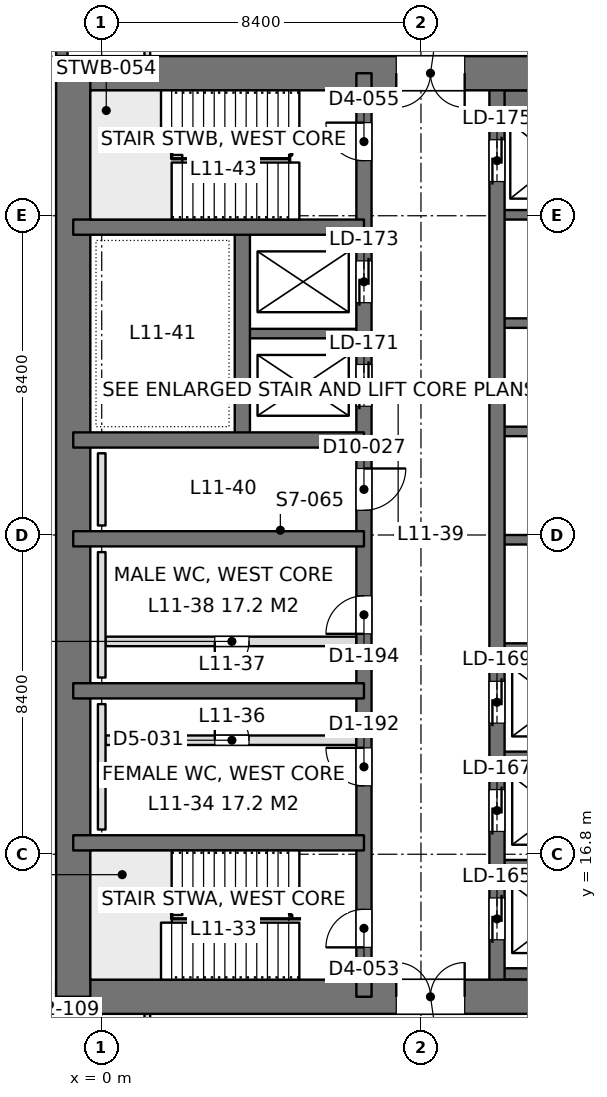
"""IFC4 building model, lengths in metres.
Left out: names, types, materials, properties, quantities, classifications, styles, units other than length and angle.
Written with IfcOpenShell. Run it as: python <this file> out.ifc"""

import sys

from ifc_helpers import new_model, si_unit, direction, frame, frame_2d, origin, place, context, subcontext, project, spatial, rectangle, extrude, element, fill, save


model = new_model("IFC4")
c1 = context("Model", 3, precision=1e-05, world=origin(), true_north=direction((0.0, 1.0)))
c2 = subcontext(c1, "Body", "Model", "MODEL_VIEW")
j1 = project(units=[si_unit("LENGTHUNIT", "METRE"), si_unit("PLANEANGLEUNIT", "RADIAN")], contexts=[c1])
p1 = place(None, origin())
s1 = spatial("IfcSite", under=j1, at=p1, CompositionType="ELEMENT")
p2 = place(p1, origin())
s2 = spatial("IfcBuilding", under=s1, at=p2, CompositionType="ELEMENT")
p3 = place(p2, frame((0.0, 0.0, 50.4)))
s3 = spatial("IfcBuildingStorey", under=s2, at=p3, CompositionType="ELEMENT", Elevation=50.4)
p4 = place(p3, frame((-1.2, 13.05, 0.0), z_axis=(0.0, 0.0, 1.0), x_axis=(1.0, 0.0, 0.0)))
e1 = element("IfcWall", 1, at=p4, inside=s3, PredefinedType="SHEAR", context=c2, shape_type="SweptSolid", body=[
    extrude(rectangle(XDim=18.0, YDim=0.9, at=frame_2d((9.0, 0.0))), origin(), (0.0, 0.0, 1.0), 4.5),
])
p5 = place(p4, frame((8.95, 0.0, 0.0)))
e2 = element("IfcOpeningElement", 2, at=p5, cuts=e1, PredefinedType="OPENING", context=c2, shape_type="SweptSolid", body=[
    extrude(rectangle(XDim=1.8, YDim=2.4, at=frame_2d((0.9, 1.2))), frame((0.0, 0.46, 0.0), z_axis=(0.0, -1.0, 0.0), x_axis=(1.0, 0.0, 0.0)), (0.0, 0.0, 1.0), 0.92),
])
p6 = place(p3, frame((-1.2, 37.35, 0.0), z_axis=(0.0, 0.0, 1.0), x_axis=(1.0, 0.0, 0.0)))
e3 = element("IfcWall", 3, at=p6, inside=s3, PredefinedType="SHEAR", context=c2, shape_type="SweptSolid", body=[
    extrude(rectangle(XDim=18.0, YDim=0.9, at=frame_2d((9.0, 0.0))), origin(), (0.0, 0.0, 1.0), 4.5),
])
p7 = place(p6, frame((8.95, 0.0, 0.0)))
e4 = element("IfcOpeningElement", 4, at=p7, cuts=e3, PredefinedType="OPENING", context=c2, shape_type="SweptSolid", body=[
    extrude(rectangle(XDim=1.8, YDim=2.4, at=frame_2d((0.9, 1.2))), frame((0.0, 0.46, 0.0), z_axis=(0.0, -1.0, 0.0), x_axis=(1.0, 0.0, 0.0)), (0.0, 0.0, 1.0), 0.92),
])
p8 = place(p3, frame((-0.75, 13.05, 0.0), z_axis=(0.0, 0.0, 1.0), x_axis=(0.0, 1.0, 0.0)))
e5 = element("IfcWall", 5, at=p8, inside=s3, PredefinedType="SHEAR", context=c2, shape_type="SweptSolid", body=[
    extrude(rectangle(XDim=24.3, YDim=0.9, at=frame_2d((12.15, 0.0))), origin(), (0.0, 0.0, 1.0), 4.5),
])
p9 = place(p3, frame((6.9, 13.05, 0.0), z_axis=(0.0, 0.0, 1.0), x_axis=(0.0, 1.0, 0.0)))
e6 = element("IfcWall", 6, at=p9, inside=s3, PredefinedType="SHEAR", context=c2, shape_type="SweptSolid", body=[
    extrude(rectangle(XDim=24.3, YDim=0.4, at=frame_2d((12.15, 0.0))), origin(), (0.0, 0.0, 1.0), 4.5),
])
p10 = place(p9, frame((1.3, 0.0, 0.0)))
e7 = element("IfcOpeningElement", 7, at=p10, cuts=e6, PredefinedType="OPENING", context=c2, shape_type="SweptSolid", body=[
    extrude(rectangle(XDim=1.0, YDim=2.2, at=frame_2d((0.5, 1.1))), frame((0.0, 0.21, 0.0), z_axis=(0.0, -1.0, 0.0), x_axis=(1.0, 0.0, 0.0)), (0.0, 0.0, 1.0), 0.42),
])
p11 = place(p9, frame((22.0, 0.0, 0.0)))
e8 = element("IfcOpeningElement", 8, at=p11, cuts=e6, PredefinedType="OPENING", context=c2, shape_type="SweptSolid", body=[
    extrude(rectangle(XDim=1.0, YDim=2.2, at=frame_2d((0.5, 1.1))), frame((0.0, 0.21, 0.0), z_axis=(0.0, -1.0, 0.0), x_axis=(1.0, 0.0, 0.0)), (0.0, 0.0, 1.0), 0.42),
])
p12 = place(p9, frame((5.55, 0.0, 0.0)))
e9 = element("IfcOpeningElement", 9, at=p12, cuts=e6, PredefinedType="OPENING", context=c2, shape_type="SweptSolid", body=[
    extrude(rectangle(XDim=1.0, YDim=2.2, at=frame_2d((0.5, 1.1))), frame((0.0, 0.21, 0.0), z_axis=(0.0, -1.0, 0.0), x_axis=(1.0, 0.0, 0.0)), (0.0, 0.0, 1.0), 0.42),
])
p13 = place(p9, frame((9.55, 0.0, 0.0)))
e10 = element("IfcOpeningElement", 10, at=p13, cuts=e6, PredefinedType="OPENING", context=c2, shape_type="SweptSolid", body=[
    extrude(rectangle(XDim=1.0, YDim=2.2, at=frame_2d((0.5, 1.1))), frame((0.0, 0.21, 0.0), z_axis=(0.0, -1.0, 0.0), x_axis=(1.0, 0.0, 0.0)), (0.0, 0.0, 1.0), 0.42),
])
p14 = place(p9, frame((12.8, 0.0, 0.0)))
e11 = element("IfcOpeningElement", 11, at=p14, cuts=e6, PredefinedType="OPENING", context=c2, shape_type="SweptSolid", body=[
    extrude(rectangle(XDim=1.1, YDim=2.2, at=frame_2d((0.55, 1.1))), frame((0.0, 0.21, 0.0), z_axis=(0.0, -1.0, 0.0), x_axis=(1.0, 0.0, 0.0)), (0.0, 0.0, 1.0), 0.42),
])
p15 = place(p9, frame((15.538, 0.0, 0.0)))
e12 = element("IfcOpeningElement", 12, at=p15, cuts=e6, PredefinedType="OPENING", context=c2, shape_type="SweptSolid", body=[
    extrude(rectangle(XDim=1.1, YDim=2.2, at=frame_2d((0.55, 1.1))), frame((0.0, 0.21, 0.0), z_axis=(0.0, -1.0, 0.0), x_axis=(1.0, 0.0, 0.0)), (0.0, 0.0, 1.0), 0.42),
])
p16 = place(p9, frame((18.262, 0.0, 0.0)))
e13 = element("IfcOpeningElement", 13, at=p16, cuts=e6, PredefinedType="OPENING", context=c2, shape_type="SweptSolid", body=[
    extrude(rectangle(XDim=1.1, YDim=2.2, at=frame_2d((0.55, 1.1))), frame((0.0, 0.21, 0.0), z_axis=(0.0, -1.0, 0.0), x_axis=(1.0, 0.0, 0.0)), (0.0, 0.0, 1.0), 0.42),
])
p17 = place(p3, frame((10.4, 13.05, 0.0), z_axis=(0.0, 0.0, 1.0), x_axis=(0.0, 1.0, 0.0)))
e14 = element("IfcWall", 14, at=p17, inside=s3, PredefinedType="SHEAR", context=c2, shape_type="SweptSolid", body=[
    extrude(rectangle(XDim=24.3, YDim=0.4, at=frame_2d((12.15, 0.0))), origin(), (0.0, 0.0, 1.0), 4.5),
])
p18 = place(p17, frame((1.5, 0.0, 0.0)))
e15 = element("IfcOpeningElement", 15, at=p18, cuts=e14, PredefinedType="OPENING", context=c2, shape_type="SweptSolid", body=[
    extrude(rectangle(XDim=1.1, YDim=2.2, at=frame_2d((0.55, 1.1))), frame((0.0, 0.21, 0.0), z_axis=(0.0, -1.0, 0.0), x_axis=(1.0, 0.0, 0.0)), (0.0, 0.0, 1.0), 0.42),
])
p19 = place(p17, frame((4.35, 0.0, 0.0)))
e16 = element("IfcOpeningElement", 16, at=p19, cuts=e14, PredefinedType="OPENING", context=c2, shape_type="SweptSolid", body=[
    extrude(rectangle(XDim=1.1, YDim=2.2, at=frame_2d((0.55, 1.1))), frame((0.0, 0.21, 0.0), z_axis=(0.0, -1.0, 0.0), x_axis=(1.0, 0.0, 0.0)), (0.0, 0.0, 1.0), 0.42),
])
p20 = place(p17, frame((7.2, 0.0, 0.0)))
e17 = element("IfcOpeningElement", 17, at=p20, cuts=e14, PredefinedType="OPENING", context=c2, shape_type="SweptSolid", body=[
    extrude(rectangle(XDim=1.1, YDim=2.2, at=frame_2d((0.55, 1.1))), frame((0.0, 0.21, 0.0), z_axis=(0.0, -1.0, 0.0), x_axis=(1.0, 0.0, 0.0)), (0.0, 0.0, 1.0), 0.42),
])
p21 = place(p17, frame((21.45, 0.0, 0.0)))
e18 = element("IfcOpeningElement", 18, at=p21, cuts=e14, PredefinedType="OPENING", context=c2, shape_type="SweptSolid", body=[
    extrude(rectangle(XDim=1.1, YDim=2.2, at=frame_2d((0.55, 1.1))), frame((0.0, 0.21, 0.0), z_axis=(0.0, -1.0, 0.0), x_axis=(1.0, 0.0, 0.0)), (0.0, 0.0, 1.0), 0.42),
])
for number, where, z_axis, x_axis in (
    (19, (-0.75, 17.1, 0.0), (0.0, 0.0, 1.0), (1.0, 0.0, 0.0)),
    (20, (-0.75, 21.1, 0.0), (0.0, 0.0, 1.0), (1.0, 0.0, 0.0)),
    (21, (-0.75, 25.1, 0.0), (0.0, 0.0, 1.0), (1.0, 0.0, 0.0)),
    (22, (-0.75, 27.7, 0.0), (0.0, 0.0, 1.0), (1.0, 0.0, 0.0)),
    (23, (-0.75, 33.3, 0.0), (0.0, 0.0, 1.0), (1.0, 0.0, 0.0)),
):
    element("IfcWall", number, at=place(p3, frame(where, z_axis=z_axis, x_axis=x_axis)), inside=s3, PredefinedType="SHEAR", context=c2, shape_type="SweptSolid", body=[
        extrude(rectangle(XDim=7.65, YDim=0.4, at=frame_2d((3.825, 0.0))), origin(), (0.0, 0.0, 1.0), 4.5),
    ])
p22 = place(p3, frame((3.7, 27.7, 0.0), z_axis=(0.0, 0.0, 1.0), x_axis=(0.0, 1.0, 0.0)))
e24 = element("IfcWall", 24, at=p22, inside=s3, PredefinedType="SHEAR", context=c2, shape_type="SweptSolid", body=[
    extrude(rectangle(XDim=5.6, YDim=0.4, at=frame_2d((2.8, 0.0))), origin(), (0.0, 0.0, 1.0), 4.5),
])
p23 = place(p3, frame((3.7, 30.5, 0.0), z_axis=(0.0, 0.0, 1.0), x_axis=(1.0, 0.0, 0.0)))
e25 = element("IfcWall", 25, at=p23, inside=s3, PredefinedType="SHEAR", context=c2, shape_type="SweptSolid", body=[
    extrude(rectangle(XDim=3.2, YDim=0.25, at=frame_2d((1.6, 0.0))), origin(), (0.0, 0.0, 1.0), 4.5),
])
p24 = place(p3, frame((10.4, 13.65, 0.0), z_axis=(0.0, 0.0, 1.0), x_axis=(1.0, 0.0, 0.0)))
e26 = element("IfcWall", 26, at=p24, inside=s3, PredefinedType="SHEAR", context=c2, shape_type="SweptSolid", body=[
    extrude(rectangle(XDim=3.2, YDim=0.3, at=frame_2d((1.6, 0.0))), origin(), (0.0, 0.0, 1.0), 4.5),
])
for number, where, z_axis, x_axis in (
    (27, (10.4, 16.525, 0.0), (0.0, 0.0, 1.0), (1.0, 0.0, 0.0)),
    (28, (10.4, 19.375, 0.0), (0.0, 0.0, 1.0), (1.0, 0.0, 0.0)),
    (29, (10.4, 22.225, 0.0), (0.0, 0.0, 1.0), (1.0, 0.0, 0.0)),
    (30, (10.4, 25.075, 0.0), (0.0, 0.0, 1.0), (1.0, 0.0, 0.0)),
    (31, (10.4, 27.925, 0.0), (0.0, 0.0, 1.0), (1.0, 0.0, 0.0)),
    (32, (10.4, 30.775, 0.0), (0.0, 0.0, 1.0), (1.0, 0.0, 0.0)),
    (33, (10.4, 33.625, 0.0), (0.0, 0.0, 1.0), (1.0, 0.0, 0.0)),
):
    element("IfcWall", number, at=place(p3, frame(where, z_axis=z_axis, x_axis=x_axis)), inside=s3, PredefinedType="SHEAR", context=c2, shape_type="SweptSolid", body=[
        extrude(rectangle(XDim=3.2, YDim=0.25, at=frame_2d((1.6, 0.0))), origin(), (0.0, 0.0, 1.0), 4.5),
    ])
p25 = place(p3, frame((10.4, 36.625, 0.0), z_axis=(0.0, 0.0, 1.0), x_axis=(1.0, 0.0, 0.0)))
e34 = element("IfcWall", 34, at=p25, inside=s3, PredefinedType="SHEAR", context=c2, shape_type="SweptSolid", body=[
    extrude(rectangle(XDim=3.2, YDim=0.55, at=frame_2d((1.6, 0.0))), origin(), (0.0, 0.0, 1.0), 4.5),
])
p26 = place(p3, frame((-1.05, 8.4, 0.0), z_axis=(0.0, 0.0, 1.0), x_axis=(0.0, 1.0, 0.0)))
e35 = element("IfcWall", 35, at=p26, inside=s3, PredefinedType="SOLIDWALL", context=c2, shape_type="SweptSolid", body=[
    extrude(rectangle(XDim=4.2, YDim=0.3, at=frame_2d((2.1, 0.0))), origin(), (0.0, 0.0, 1.0), 4.34),
])
p27 = place(p26, frame((0.9, 0.0, 0.9)))
e36 = element("IfcOpeningElement", 36, at=p27, cuts=e35, PredefinedType="OPENING", context=c2, shape_type="SweptSolid", body=[
    extrude(rectangle(XDim=2.4, YDim=1.9, at=frame_2d((1.2, 0.95))), frame((0.0, 0.16, 0.0), z_axis=(0.0, -1.0, 0.0), x_axis=(1.0, 0.0, 0.0)), (0.0, 0.0, 1.0), 0.32),
])
p28 = place(p3, frame((-1.05, 37.8, 0.0), z_axis=(0.0, 0.0, 1.0), x_axis=(0.0, 1.0, 0.0)))
e37 = element("IfcWall", 37, at=p28, inside=s3, PredefinedType="SOLIDWALL", context=c2, shape_type="SweptSolid", body=[
    extrude(rectangle(XDim=4.2, YDim=0.3, at=frame_2d((2.1, 0.0))), origin(), (0.0, 0.0, 1.0), 4.34),
])
p29 = place(p28, frame((0.9, 0.0, 0.9)))
e38 = element("IfcOpeningElement", 38, at=p29, cuts=e37, PredefinedType="OPENING", context=c2, shape_type="SweptSolid", body=[
    extrude(rectangle(XDim=2.4, YDim=1.9, at=frame_2d((1.2, 0.95))), frame((0.0, 0.16, 0.0), z_axis=(0.0, -1.0, 0.0), x_axis=(1.0, 0.0, 0.0)), (0.0, 0.0, 1.0), 0.32),
])
p30 = place(p3, frame((1.2, 10.8, 0.0), z_axis=(0.0, 0.0, 1.0), x_axis=(0.0, 1.0, 0.0)))
e39 = element("IfcWall", 39, at=p30, inside=s3, PredefinedType="PARTITIONING", context=c2, shape_type="SweptSolid", body=[
    extrude(rectangle(XDim=1.802, YDim=0.15, at=frame_2d((0.901, 0.0))), origin(), (0.0, 0.0, 1.0), 4.34),
])
p31 = place(p3, frame((1.2, 37.8, 0.0), z_axis=(0.0, 0.0, 1.0), x_axis=(0.0, 1.0, 0.0)))
e40 = element("IfcWall", 40, at=p31, inside=s3, PredefinedType="PARTITIONING", context=c2, shape_type="SweptSolid", body=[
    extrude(rectangle(XDim=1.8, YDim=0.15, at=frame_2d((0.9, 0.0))), origin(), (0.0, 0.0, 1.0), 4.34),
])
p32 = place(p3, frame((0.1, 22.4, 0.0), z_axis=(0.0, 0.0, 1.0), x_axis=(1.0, 0.0, 0.0)))
e41 = element("IfcWall", 41, at=p32, inside=s3, PredefinedType="PARTITIONING", context=c2, shape_type="SweptSolid", body=[
    extrude(rectangle(XDim=6.6, YDim=0.25, at=frame_2d((3.3, 0.0))), origin(), (0.0, 0.0, 1.0), 4.3),
])
p33 = place(p32, frame((2.875, 0.0, 0.0)))
e42 = element("IfcOpeningElement", 42, at=p33, cuts=e41, PredefinedType="OPENING", context=c2, shape_type="SweptSolid", body=[
    extrude(rectangle(XDim=0.9, YDim=2.2, at=frame_2d((0.45, 1.1))), frame((0.0, 0.135, 0.0), z_axis=(0.0, -1.0, 0.0), x_axis=(1.0, 0.0, 0.0)), (0.0, 0.0, 1.0), 0.27),
])
p34 = place(p3, frame((0.1, 19.8, 0.0), z_axis=(0.0, 0.0, 1.0), x_axis=(1.0, 0.0, 0.0)))
e43 = element("IfcWall", 43, at=p34, inside=s3, PredefinedType="PARTITIONING", context=c2, shape_type="SweptSolid", body=[
    extrude(rectangle(XDim=6.6, YDim=0.25, at=frame_2d((3.3, 0.0))), origin(), (0.0, 0.0, 1.0), 4.3),
])
p35 = place(p34, frame((2.875, 0.0, 0.0)))
e44 = element("IfcOpeningElement", 44, at=p35, cuts=e43, PredefinedType="OPENING", context=c2, shape_type="SweptSolid", body=[
    extrude(rectangle(XDim=0.9, YDim=2.2, at=frame_2d((0.45, 1.1))), frame((0.0, 0.135, 0.0), z_axis=(0.0, -1.0, 0.0), x_axis=(1.0, 0.0, 0.0)), (0.0, 0.0, 1.0), 0.27),
])
for number, where, z_axis, x_axis in (
    (45, (0.0, 17.45, 0.0), (0.0, 0.0, 1.0), (0.0, 1.0, 0.0)),
    (46, (0.0, 21.45, 0.0), (0.0, 0.0, 1.0), (0.0, 1.0, 0.0)),
):
    element("IfcWall", number, at=place(p3, frame(where, z_axis=z_axis, x_axis=x_axis)), inside=s3, PredefinedType="PLUMBINGWALL", context=c2, shape_type="SweptSolid", body=[
        extrude(rectangle(XDim=3.3, YDim=0.2, at=frame_2d((1.65, 0.0))), origin(), (0.0, 0.0, 1.0), 1.2),
    ])
p36 = place(p3, frame((0.0, 25.45, 0.0), z_axis=(0.0, 0.0, 1.0), x_axis=(0.0, 1.0, 0.0)))
e47 = element("IfcWall", 47, at=p36, inside=s3, PredefinedType="PLUMBINGWALL", context=c2, shape_type="SweptSolid", body=[
    extrude(rectangle(XDim=1.9, YDim=0.2, at=frame_2d((0.95, 0.0))), origin(), (0.0, 0.0, 1.0), 1.2),
])
p37 = place(p5, origin())
e48 = element("IfcDoor", 48, at=p37, inside=s3, OperationType="DOUBLE_DOOR_SINGLE_SWING", PredefinedType="DOOR", context=c2, shape_type="SweptSolid", body=[
    extrude(rectangle(XDim=1.8, YDim=2.4, at=frame_2d((0.9, 1.2))), frame((0.0, 0.025, 0.0), z_axis=(0.0, -1.0, 0.0), x_axis=(1.0, 0.0, 0.0)), (0.0, 0.0, 1.0), 0.05),
])
fill(e2, e48)
p38 = place(p7, frame((1.8, 0.0, 0.0), z_axis=(0.0, 0.0, 1.0), x_axis=(-1.0, 0.0, 0.0)))
e49 = element("IfcDoor", 49, at=p38, inside=s3, OperationType="DOUBLE_DOOR_SINGLE_SWING", PredefinedType="DOOR", context=c2, shape_type="SweptSolid", body=[
    extrude(rectangle(XDim=1.8, YDim=2.4, at=frame_2d((0.9, 1.2))), frame((0.0, 0.025, 0.0), z_axis=(0.0, -1.0, 0.0), x_axis=(1.0, 0.0, 0.0)), (0.0, 0.0, 1.0), 0.05),
])
fill(e4, e49)
p39 = place(p10, origin())
e50 = element("IfcDoor", 50, at=p39, inside=s3, OperationType="SINGLE_SWING_LEFT", PredefinedType="DOOR", context=c2, shape_type="SweptSolid", body=[
    extrude(rectangle(XDim=1.0, YDim=2.2, at=frame_2d((0.5, 1.1))), frame((0.0, 0.025, 0.0), z_axis=(0.0, -1.0, 0.0), x_axis=(1.0, 0.0, 0.0)), (0.0, 0.0, 1.0), 0.05),
])
fill(e7, e50)
p40 = place(p11, origin())
e51 = element("IfcDoor", 51, at=p40, inside=s3, OperationType="SINGLE_SWING_RIGHT", PredefinedType="DOOR", context=c2, shape_type="SweptSolid", body=[
    extrude(rectangle(XDim=1.0, YDim=2.2, at=frame_2d((0.5, 1.1))), frame((0.0, 0.025, 0.0), z_axis=(0.0, -1.0, 0.0), x_axis=(1.0, 0.0, 0.0)), (0.0, 0.0, 1.0), 0.05),
])
fill(e8, e51)
p41 = place(p12, origin())
e52 = element("IfcDoor", 52, at=p41, inside=s3, OperationType="SINGLE_SWING_RIGHT", PredefinedType="DOOR", context=c2, shape_type="SweptSolid", body=[
    extrude(rectangle(XDim=1.0, YDim=2.2, at=frame_2d((0.5, 1.1))), frame((0.0, 0.025, 0.0), z_axis=(0.0, -1.0, 0.0), x_axis=(1.0, 0.0, 0.0)), (0.0, 0.0, 1.0), 0.05),
])
fill(e9, e52)
p42 = place(p13, origin())
e53 = element("IfcDoor", 53, at=p42, inside=s3, OperationType="SINGLE_SWING_LEFT", PredefinedType="DOOR", context=c2, shape_type="SweptSolid", body=[
    extrude(rectangle(XDim=1.0, YDim=2.2, at=frame_2d((0.5, 1.1))), frame((0.0, 0.025, 0.0), z_axis=(0.0, -1.0, 0.0), x_axis=(1.0, 0.0, 0.0)), (0.0, 0.0, 1.0), 0.05),
])
fill(e10, e53)
p43 = place(p14, frame((1.1, 0.0, 0.0), z_axis=(0.0, 0.0, 1.0), x_axis=(-1.0, 0.0, 0.0)))
e54 = element("IfcDoor", 54, at=p43, inside=s3, OperationType="SINGLE_SWING_LEFT", PredefinedType="DOOR", context=c2, shape_type="SweptSolid", body=[
    extrude(rectangle(XDim=1.1, YDim=2.2, at=frame_2d((0.55, 1.1))), frame((0.0, 0.025, 0.0), z_axis=(0.0, -1.0, 0.0), x_axis=(1.0, 0.0, 0.0)), (0.0, 0.0, 1.0), 0.05),
])
fill(e11, e54)
p44 = place(p18, origin())
e55 = element("IfcDoor", 55, at=p44, inside=s3, OperationType="DOUBLE_DOOR_SLIDING", PredefinedType="DOOR", context=c2, shape_type="SweptSolid", body=[
    extrude(rectangle(XDim=1.1, YDim=2.2, at=frame_2d((0.55, 1.1))), frame((0.0, 0.025, 0.0), z_axis=(0.0, -1.0, 0.0), x_axis=(1.0, 0.0, 0.0)), (0.0, 0.0, 1.0), 0.05),
])
fill(e15, e55)
p45 = place(p19, origin())
e56 = element("IfcDoor", 56, at=p45, inside=s3, OperationType="DOUBLE_DOOR_SLIDING", PredefinedType="DOOR", context=c2, shape_type="SweptSolid", body=[
    extrude(rectangle(XDim=1.1, YDim=2.2, at=frame_2d((0.55, 1.1))), frame((0.0, 0.025, 0.0), z_axis=(0.0, -1.0, 0.0), x_axis=(1.0, 0.0, 0.0)), (0.0, 0.0, 1.0), 0.05),
])
fill(e16, e56)
p46 = place(p20, origin())
e57 = element("IfcDoor", 57, at=p46, inside=s3, OperationType="DOUBLE_DOOR_SLIDING", PredefinedType="DOOR", context=c2, shape_type="SweptSolid", body=[
    extrude(rectangle(XDim=1.1, YDim=2.2, at=frame_2d((0.55, 1.1))), frame((0.0, 0.025, 0.0), z_axis=(0.0, -1.0, 0.0), x_axis=(1.0, 0.0, 0.0)), (0.0, 0.0, 1.0), 0.05),
])
fill(e17, e57)
p47 = place(p21, origin())
e58 = element("IfcDoor", 58, at=p47, inside=s3, OperationType="DOUBLE_DOOR_SLIDING", PredefinedType="DOOR", context=c2, shape_type="SweptSolid", body=[
    extrude(rectangle(XDim=1.1, YDim=2.2, at=frame_2d((0.55, 1.1))), frame((0.0, 0.025, 0.0), z_axis=(0.0, -1.0, 0.0), x_axis=(1.0, 0.0, 0.0)), (0.0, 0.0, 1.0), 0.05),
])
fill(e18, e58)
p48 = place(p15, origin())
e59 = element("IfcDoor", 59, at=p48, inside=s3, OperationType="DOUBLE_DOOR_SLIDING", PredefinedType="DOOR", context=c2, shape_type="SweptSolid", body=[
    extrude(rectangle(XDim=1.1, YDim=2.2, at=frame_2d((0.55, 1.1))), frame((0.0, 0.025, 0.0), z_axis=(0.0, -1.0, 0.0), x_axis=(1.0, 0.0, 0.0)), (0.0, 0.0, 1.0), 0.05),
])
fill(e12, e59)
p49 = place(p16, origin())
e60 = element("IfcDoor", 60, at=p49, inside=s3, OperationType="DOUBLE_DOOR_SLIDING", PredefinedType="DOOR", context=c2, shape_type="SweptSolid", body=[
    extrude(rectangle(XDim=1.1, YDim=2.2, at=frame_2d((0.55, 1.1))), frame((0.0, 0.025, 0.0), z_axis=(0.0, -1.0, 0.0), x_axis=(1.0, 0.0, 0.0)), (0.0, 0.0, 1.0), 0.05),
])
fill(e13, e60)
p50 = place(p33, frame((0.9, 0.0, 0.0), z_axis=(0.0, 0.0, 1.0), x_axis=(-1.0, 0.0, 0.0)))
e61 = element("IfcDoor", 61, at=p50, inside=s3, OperationType="SINGLE_SWING_RIGHT", PredefinedType="DOOR", context=c2, shape_type="SweptSolid", body=[
    extrude(rectangle(XDim=0.9, YDim=2.2, at=frame_2d((0.45, 1.1))), frame((0.0, 0.025, 0.0), z_axis=(0.0, -1.0, 0.0), x_axis=(1.0, 0.0, 0.0)), (0.0, 0.0, 1.0), 0.05),
])
fill(e42, e61)
p51 = place(p35, origin())
e62 = element("IfcDoor", 62, at=p51, inside=s3, OperationType="SINGLE_SWING_LEFT", PredefinedType="DOOR", context=c2, shape_type="SweptSolid", body=[
    extrude(rectangle(XDim=0.9, YDim=2.2, at=frame_2d((0.45, 1.1))), frame((0.0, 0.025, 0.0), z_axis=(0.0, -1.0, 0.0), x_axis=(1.0, 0.0, 0.0)), (0.0, 0.0, 1.0), 0.05),
])
fill(e44, e62)
save(model, sys.argv[1])
